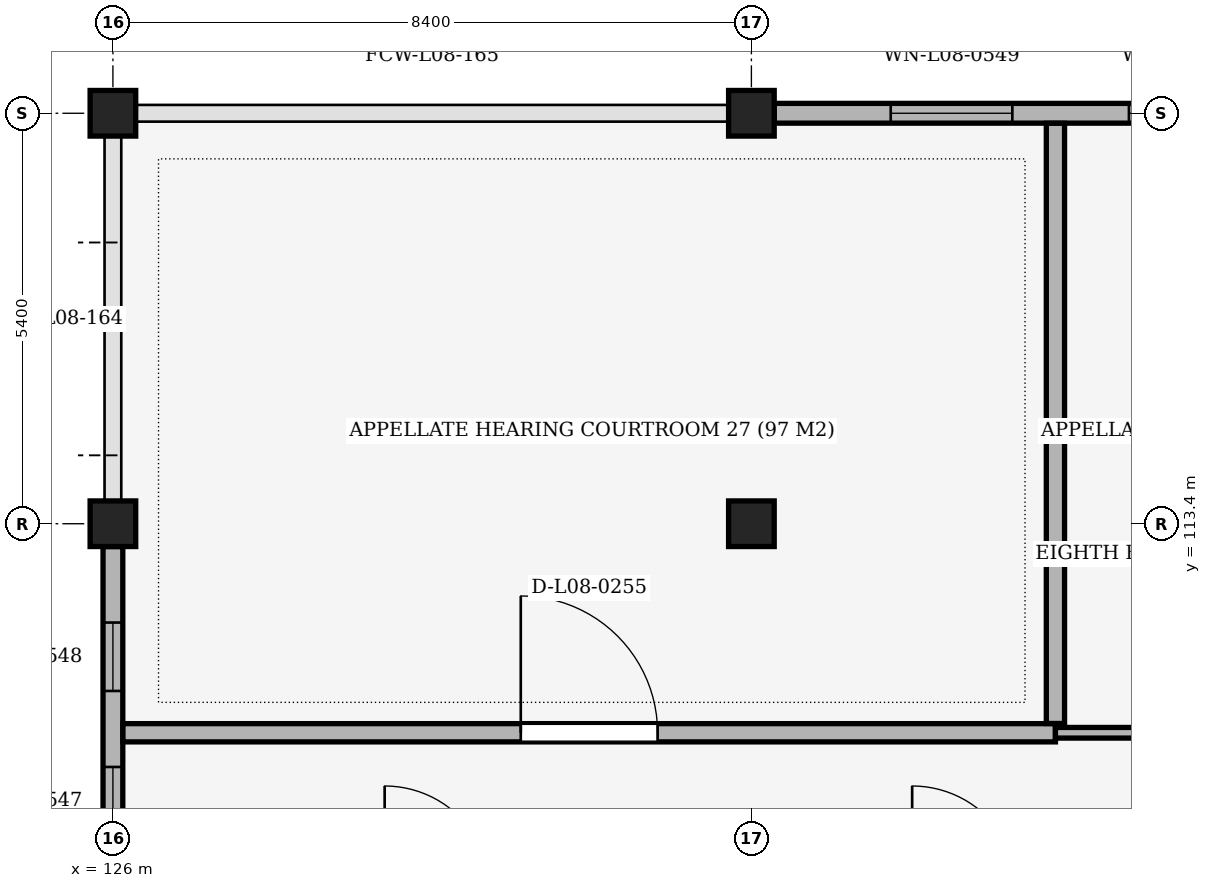
"""IFC4 building model, lengths in metres.
Left out: names, types, materials, properties, quantities, classifications, styles, units other than length and angle.
Written with IfcOpenShell. Run it as: python <this file> out.ifc"""

import sys

from ifc_helpers import new_model, si_unit, direction, frame, frame_2d, origin, origin_2d, place, context, subcontext, project, spatial, rectangle, extrude, element, fill, save


model = new_model("IFC4")
c1 = context("Model", 3, precision=1e-05, world=origin(), true_north=direction((0.0, 1.0)))
c2 = subcontext(c1, "Body", "Model", "MODEL_VIEW")
j1 = project(units=[si_unit("LENGTHUNIT", "METRE"), si_unit("PLANEANGLEUNIT", "RADIAN")], contexts=[c1])
p1 = place(None, origin())
s1 = spatial("IfcSite", under=j1, at=p1, CompositionType="ELEMENT")
p2 = place(p1, origin())
s2 = spatial("IfcBuilding", under=s1, at=p2, CompositionType="ELEMENT")
p3 = place(p2, frame((0.0, 0.0, 37.8)))
s3 = spatial("IfcBuildingStorey", under=s2, at=p3, CompositionType="ELEMENT", Elevation=37.8)
for number, where, z_axis, x_axis in (
    (1, (126.0, 113.4, 0.0), (0.0, 0.0, 1.0), (1.0, 0.0, 0.0)),
    (2, (126.0, 118.8, 0.0), (0.0, 0.0, 1.0), (1.0, 0.0, 0.0)),
    (3, (134.4, 113.4, 0.0), (0.0, 0.0, 1.0), (1.0, 0.0, 0.0)),
    (4, (134.4, 118.8, 0.0), (0.0, 0.0, 1.0), (1.0, 0.0, 0.0)),
):
    element("IfcColumn", number, at=place(p3, frame(where, z_axis=z_axis, x_axis=x_axis)), inside=s3, PredefinedType="COLUMN", context=c2, shape_type="SweptSolid", body=[
        extrude(rectangle(XDim=0.6, YDim=0.6, at=origin_2d()), origin(), (0.0, 0.0, 1.0), 4.2),
    ])
p4 = place(p3, frame((126.0, 108.3, 0.0), z_axis=(0.0, 0.0, 1.0), x_axis=(0.0, 1.0, 0.0)))
e5 = element("IfcWall", 5, at=p4, inside=s3, PredefinedType="SOLIDWALL", context=c2, shape_type="SweptSolid", body=[
    extrude(rectangle(XDim=4.8, YDim=0.26, at=frame_2d((2.4, 0.0))), origin(), (0.0, 0.0, 1.0), 3.41),
])
p5 = place(p4, frame((1.0, 0.0, 0.9)))
e6 = element("IfcOpeningElement", 6, at=p5, cuts=e5, PredefinedType="OPENING", context=c2, shape_type="SweptSolid", body=[
    extrude(rectangle(XDim=0.9, YDim=2.2, at=frame_2d((0.45, 1.1))), frame((0.0, 0.145, 0.0), z_axis=(0.0, -1.0, 0.0), x_axis=(1.0, 0.0, 0.0)), (0.0, 0.0, 1.0), 0.29),
])
p6 = place(p4, frame((2.9, 0.0, 0.9)))
e7 = element("IfcOpeningElement", 7, at=p6, cuts=e5, PredefinedType="OPENING", context=c2, shape_type="SweptSolid", body=[
    extrude(rectangle(XDim=0.9, YDim=2.2, at=frame_2d((0.45, 1.1))), frame((0.0, 0.145, 0.0), z_axis=(0.0, -1.0, 0.0), x_axis=(1.0, 0.0, 0.0)), (0.0, 0.0, 1.0), 0.29),
])
p7 = place(p3, frame((134.7, 118.8, 0.0), z_axis=(0.0, 0.0, 1.0), x_axis=(1.0, 0.0, 0.0)))
e8 = element("IfcWall", 8, at=p7, inside=s3, PredefinedType="SOLIDWALL", context=c2, shape_type="SweptSolid", body=[
    extrude(rectangle(XDim=7.8, YDim=0.26, at=frame_2d((3.9, 0.0))), origin(), (0.0, 0.0, 1.0), 3.26),
])
p8 = place(p7, frame((1.533, 0.0, 1.05)))
e9 = element("IfcOpeningElement", 9, at=p8, cuts=e8, PredefinedType="OPENING", context=c2, shape_type="SweptSolid", body=[
    extrude(rectangle(XDim=1.6, YDim=1.8, at=frame_2d((0.8, 0.9))), frame((0.0, 0.145, 0.0), z_axis=(0.0, -1.0, 0.0), x_axis=(1.0, 0.0, 0.0)), (0.0, 0.0, 1.0), 0.29),
])
p9 = place(p7, frame((4.667, 0.0, 1.05)))
e10 = element("IfcOpeningElement", 10, at=p9, cuts=e8, PredefinedType="OPENING", context=c2, shape_type="SweptSolid", body=[
    extrude(rectangle(XDim=1.6, YDim=1.8, at=frame_2d((0.8, 0.9))), frame((0.0, 0.145, 0.0), z_axis=(0.0, -1.0, 0.0), x_axis=(1.0, 0.0, 0.0)), (0.0, 0.0, 1.0), 0.29),
])
p10 = place(p3, frame((126.132, 110.65, 0.0), z_axis=(0.0, 0.0, 1.0), x_axis=(1.0, 0.0, 0.0)))
e11 = element("IfcWall", 11, at=p10, inside=s3, PredefinedType="PARTITIONING", context=c2, shape_type="SweptSolid", body=[
    extrude(rectangle(XDim=12.268, YDim=0.24, at=frame_2d((6.134, 0.0))), origin(), (0.0, 0.0, 1.0), 3.41),
])
p11 = place(p10, frame((5.234, 0.0, 0.0)))
e12 = element("IfcOpeningElement", 12, at=p11, cuts=e11, PredefinedType="OPENING", context=c2, shape_type="SweptSolid", body=[
    extrude(rectangle(XDim=1.8, YDim=2.4, at=frame_2d((0.9, 1.2))), frame((0.0, 0.135, 0.0), z_axis=(0.0, -1.0, 0.0), x_axis=(1.0, 0.0, 0.0)), (0.0, 0.0, 1.0), 0.27),
])
p12 = place(p3, frame((138.4, 110.65, 0.0), z_axis=(0.0, 0.0, 1.0), x_axis=(1.0, 0.0, 0.0)))
e13 = element("IfcWall", 13, at=p12, inside=s3, PredefinedType="PARTITIONING", context=c2, shape_type="SweptSolid", body=[
    extrude(rectangle(XDim=6.4, YDim=0.14, at=frame_2d((3.2, 0.0))), origin(), (0.0, 0.0, 1.0), 3.41),
])
p13 = place(p12, frame((2.7, 0.0, 0.0)))
e14 = element("IfcOpeningElement", 14, at=p13, cuts=e13, PredefinedType="OPENING", context=c2, shape_type="SweptSolid", body=[
    extrude(rectangle(XDim=1.0, YDim=2.2, at=frame_2d((0.5, 1.1))), frame((0.0, 0.085, 0.0), z_axis=(0.0, -1.0, 0.0), x_axis=(1.0, 0.0, 0.0)), (0.0, 0.0, 1.0), 0.17),
])
p14 = place(p3, frame((138.4, 110.772, 0.0), z_axis=(0.0, 0.0, 1.0), x_axis=(0.0, 1.0, 0.0)))
e15 = element("IfcWall", 15, at=p14, inside=s3, PredefinedType="PARTITIONING", context=c2, shape_type="SweptSolid", body=[
    extrude(rectangle(XDim=7.896, YDim=0.24, at=frame_2d((3.948, 0.0))), origin(), (0.0, 0.0, 1.0), 3.26),
])
p15 = place(p5, origin())
e16 = element("IfcWindow", 16, at=p15, inside=s3, PartitioningType="SINGLE_PANEL", PredefinedType="WINDOW", context=c2, shape_type="SweptSolid", body=[
    extrude(rectangle(XDim=0.9, YDim=2.2, at=frame_2d((0.45, 1.1))), frame((0.0, 0.03, 0.0), z_axis=(0.0, -1.0, 0.0), x_axis=(1.0, 0.0, 0.0)), (0.0, 0.0, 1.0), 0.06),
])
fill(e6, e16)
p16 = place(p6, origin())
e17 = element("IfcWindow", 17, at=p16, inside=s3, PartitioningType="SINGLE_PANEL", PredefinedType="WINDOW", context=c2, shape_type="SweptSolid", body=[
    extrude(rectangle(XDim=0.9, YDim=2.2, at=frame_2d((0.45, 1.1))), frame((0.0, 0.03, 0.0), z_axis=(0.0, -1.0, 0.0), x_axis=(1.0, 0.0, 0.0)), (0.0, 0.0, 1.0), 0.06),
])
fill(e7, e17)
p17 = place(p8, origin())
e18 = element("IfcWindow", 18, at=p17, inside=s3, PartitioningType="SINGLE_PANEL", PredefinedType="WINDOW", context=c2, shape_type="SweptSolid", body=[
    extrude(rectangle(XDim=1.6, YDim=1.8, at=frame_2d((0.8, 0.9))), frame((0.0, 0.03, 0.0), z_axis=(0.0, -1.0, 0.0), x_axis=(1.0, 0.0, 0.0)), (0.0, 0.0, 1.0), 0.06),
])
fill(e9, e18)
p18 = place(p9, origin())
e19 = element("IfcWindow", 19, at=p18, inside=s3, PartitioningType="SINGLE_PANEL", PredefinedType="WINDOW", context=c2, shape_type="SweptSolid", body=[
    extrude(rectangle(XDim=1.6, YDim=1.8, at=frame_2d((0.8, 0.9))), frame((0.0, 0.03, 0.0), z_axis=(0.0, -1.0, 0.0), x_axis=(1.0, 0.0, 0.0)), (0.0, 0.0, 1.0), 0.06),
])
fill(e10, e19)
p19 = place(p11, origin())
e20 = element("IfcDoor", 20, at=p19, inside=s3, OperationType="SINGLE_SWING_LEFT", PredefinedType="DOOR", context=c2, shape_type="SweptSolid", body=[
    extrude(rectangle(XDim=1.8, YDim=2.4, at=frame_2d((0.9, 1.2))), frame((0.0, 0.025, 0.0), z_axis=(0.0, -1.0, 0.0), x_axis=(1.0, 0.0, 0.0)), (0.0, 0.0, 1.0), 0.05),
])
fill(e12, e20)
save(model, sys.argv[1])
